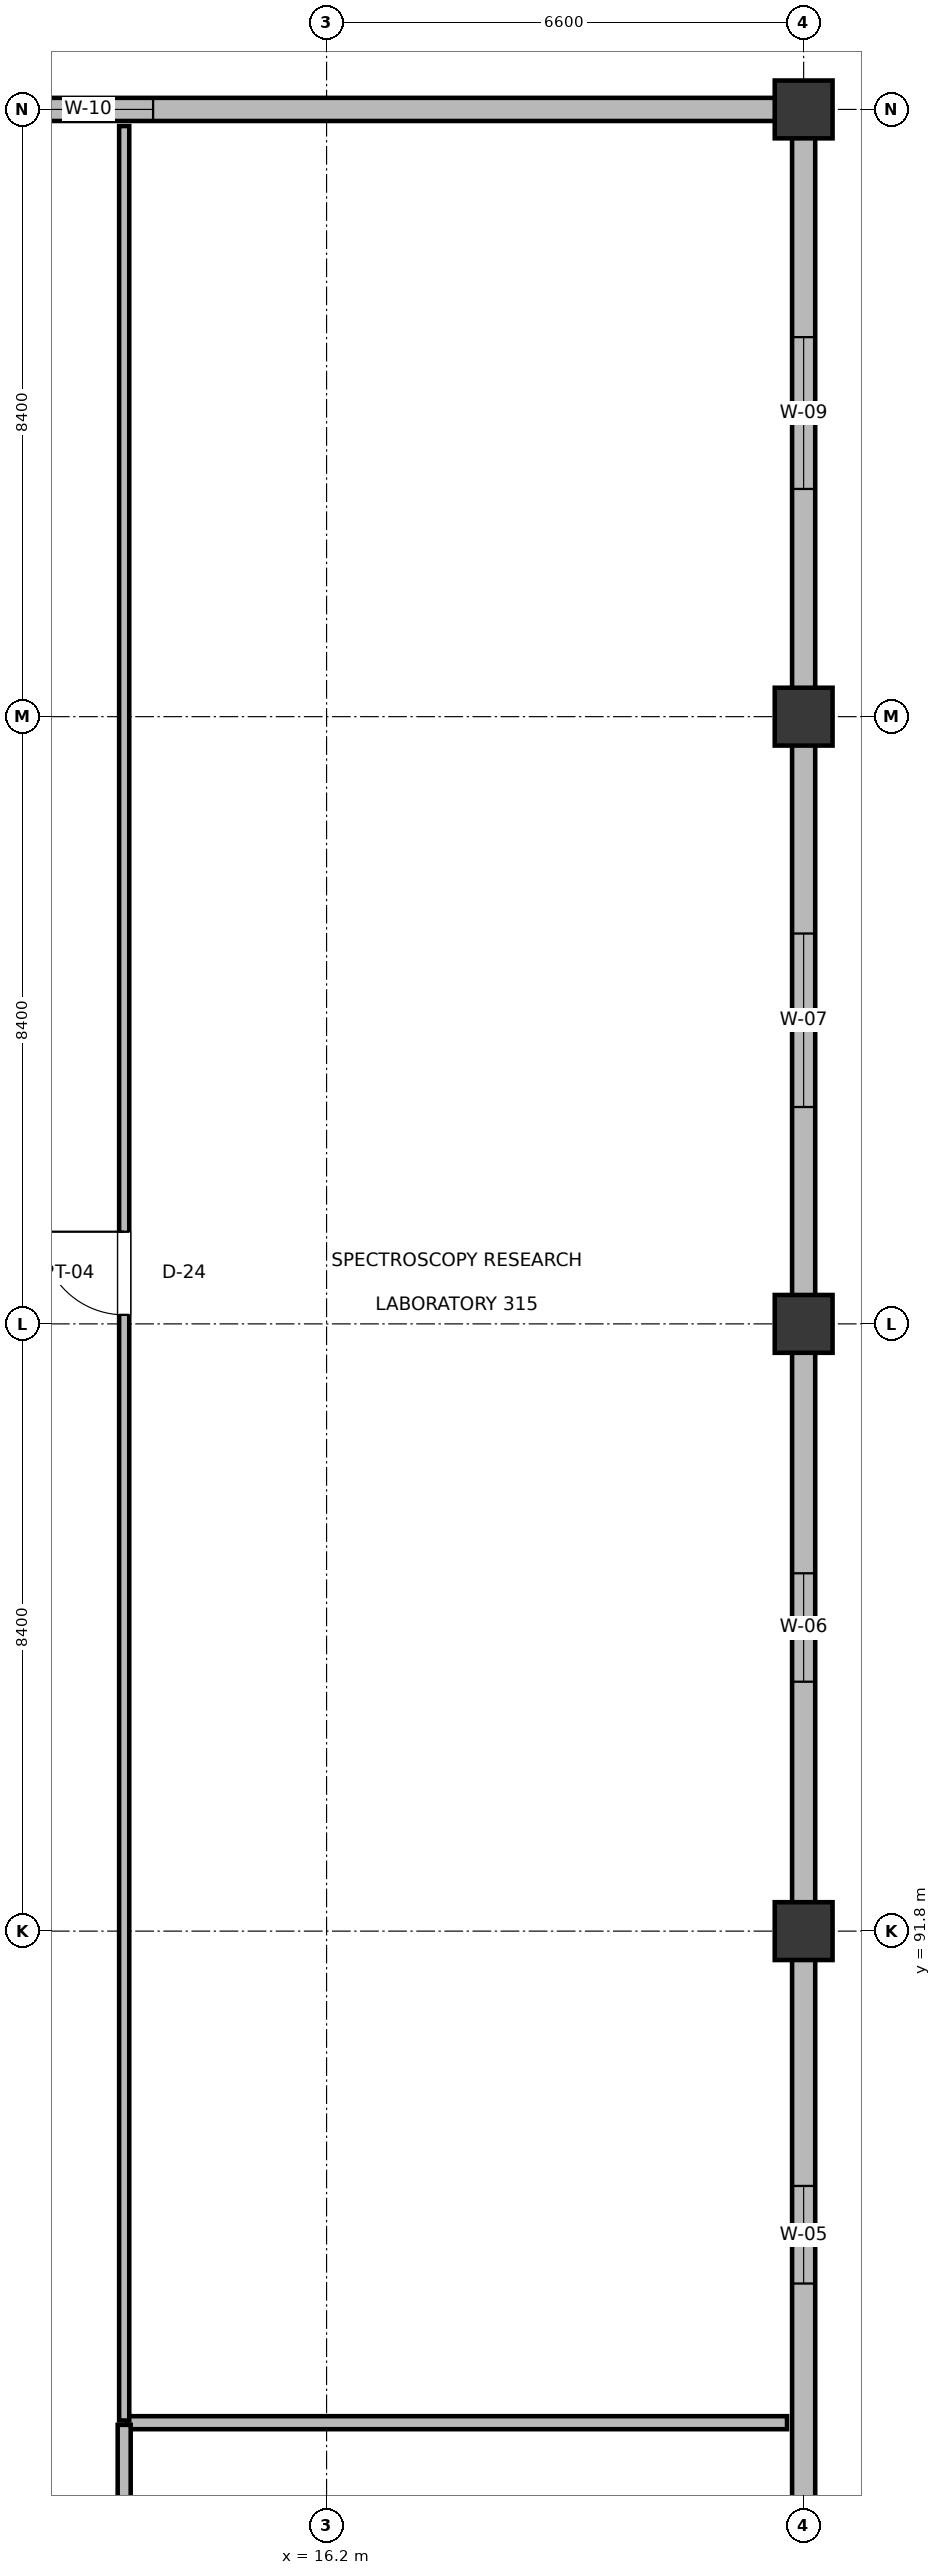
"""IFC4 building model, lengths in metres.
Left out: names, types, materials, properties, quantities, classifications, styles, units other than length and angle.
Written with IfcOpenShell. Run it as: python <this file> out.ifc"""

import sys

from ifc_helpers import new_model, si_unit, direction, frame, frame_2d, origin, origin_2d, place, context, subcontext, project, spatial, rectangle, extrude, element, fill, save


model = new_model("IFC4")
c1 = context("Model", 3, precision=1e-05, world=origin(), true_north=direction((0.0, 1.0)))
c2 = subcontext(c1, "Body", "Model", "MODEL_VIEW")
j1 = project(units=[si_unit("LENGTHUNIT", "METRE"), si_unit("PLANEANGLEUNIT", "RADIAN")], contexts=[c1])
p1 = place(None, origin())
s1 = spatial("IfcSite", under=j1, at=p1, CompositionType="ELEMENT")
p2 = place(p1, origin())
s2 = spatial("IfcBuilding", under=s1, at=p2, CompositionType="ELEMENT")
p3 = place(p2, frame((0.0, 0.0, 15.0)))
s3 = spatial("IfcBuildingStorey", under=s2, at=p3, CompositionType="ELEMENT", Elevation=15.0)
for number, where, z_axis, x_axis in (
    (1, (22.8, 91.8, 0.0), (0.0, 0.0, 1.0), (1.0, 0.0, 0.0)),
    (2, (22.8, 100.2, 0.0), (0.0, 0.0, 1.0), (1.0, 0.0, 0.0)),
    (3, (22.8, 108.6, 0.0), (0.0, 0.0, 1.0), (1.0, 0.0, 0.0)),
    (4, (22.8, 117.0, 0.0), (0.0, 0.0, 1.0), (1.0, 0.0, 0.0)),
):
    element("IfcColumn", number, at=place(p3, frame(where, z_axis=z_axis, x_axis=x_axis)), inside=s3, PredefinedType="COLUMN", context=c2, shape_type="SweptSolid", body=[
        extrude(rectangle(XDim=0.8, YDim=0.8, at=origin_2d()), origin(), (0.0, 0.0, 1.0), 4.5),
    ])
p4 = place(p3, frame((22.8, 83.785, 0.0), z_axis=(0.0, 0.0, 1.0), x_axis=(0.0, 1.0, 0.0)))
e5 = element("IfcWall", 5, at=p4, inside=s3, PredefinedType="SOLIDWALL", context=c2, shape_type="SweptSolid", body=[
    extrude(rectangle(XDim=7.63, YDim=0.32, at=frame_2d((3.815, 0.0))), origin(), (0.0, 0.0, 1.0), 3.525),
])
p5 = place(p4, frame((3.14, 0.0, 0.9)))
e6 = element("IfcOpeningElement", 6, at=p5, cuts=e5, PredefinedType="OPENING", context=c2, shape_type="SweptSolid", body=[
    extrude(rectangle(XDim=1.35, YDim=1.85, at=frame_2d((0.675, 0.925))), frame((0.0, 0.17, 0.0), z_axis=(0.0, -1.0, 0.0), x_axis=(1.0, 0.0, 0.0)), (0.0, 0.0, 1.0), 0.34),
])
p6 = place(p3, frame((22.8, 92.185, 0.0), z_axis=(0.0, 0.0, 1.0), x_axis=(0.0, 1.0, 0.0)))
e7 = element("IfcWall", 7, at=p6, inside=s3, PredefinedType="SOLIDWALL", context=c2, shape_type="SweptSolid", body=[
    extrude(rectangle(XDim=7.63, YDim=0.32, at=frame_2d((3.815, 0.0))), origin(), (0.0, 0.0, 1.0), 3.595),
])
p7 = place(p6, frame((3.065, 0.0, 0.9)))
e8 = element("IfcOpeningElement", 8, at=p7, cuts=e7, PredefinedType="OPENING", context=c2, shape_type="SweptSolid", body=[
    extrude(rectangle(XDim=1.5, YDim=1.9, at=frame_2d((0.75, 0.95))), frame((0.0, 0.17, 0.0), z_axis=(0.0, -1.0, 0.0), x_axis=(1.0, 0.0, 0.0)), (0.0, 0.0, 1.0), 0.34),
])
p8 = place(p3, frame((22.8, 100.585, 0.0), z_axis=(0.0, 0.0, 1.0), x_axis=(0.0, 1.0, 0.0)))
e9 = element("IfcWall", 9, at=p8, inside=s3, PredefinedType="SOLIDWALL", context=c2, shape_type="SweptSolid", body=[
    extrude(rectangle(XDim=7.63, YDim=0.32, at=frame_2d((3.815, 0.0))), origin(), (0.0, 0.0, 1.0), 3.595),
])
p9 = place(p8, frame((2.615, 0.0, 0.9)))
e10 = element("IfcOpeningElement", 10, at=p9, cuts=e9, PredefinedType="OPENING", context=c2, shape_type="SweptSolid", body=[
    extrude(rectangle(XDim=2.4, YDim=1.95, at=frame_2d((1.2, 0.975))), frame((0.0, 0.17, 0.0), z_axis=(0.0, -1.0, 0.0), x_axis=(1.0, 0.0, 0.0)), (0.0, 0.0, 1.0), 0.34),
])
p10 = place(p3, frame((22.8, 108.985, 0.0), z_axis=(0.0, 0.0, 1.0), x_axis=(0.0, 1.0, 0.0)))
e11 = element("IfcWall", 11, at=p10, inside=s3, PredefinedType="SOLIDWALL", context=c2, shape_type="SweptSolid", body=[
    extrude(rectangle(XDim=7.63, YDim=0.32, at=frame_2d((3.815, 0.0))), origin(), (0.0, 0.0, 1.0), 3.595),
])
p11 = place(p10, frame((2.765, 0.0, 0.9)))
e12 = element("IfcOpeningElement", 12, at=p11, cuts=e11, PredefinedType="OPENING", context=c2, shape_type="SweptSolid", body=[
    extrude(rectangle(XDim=2.1, YDim=1.9, at=frame_2d((1.05, 0.95))), frame((0.0, 0.17, 0.0), z_axis=(0.0, -1.0, 0.0), x_axis=(1.0, 0.0, 0.0)), (0.0, 0.0, 1.0), 0.34),
])
p12 = place(p3, frame((3.385, 117.0, 0.0), z_axis=(0.0, 0.0, 1.0), x_axis=(1.0, 0.0, 0.0)))
e13 = element("IfcWall", 13, at=p12, inside=s3, PredefinedType="SOLIDWALL", context=c2, shape_type="SweptSolid", body=[
    extrude(rectangle(XDim=19.03, YDim=0.32, at=frame_2d((9.515, 0.0))), origin(), (0.0, 0.0, 1.0), 3.545),
])
p13 = place(p12, frame((8.615, 0.0, 0.95)))
e14 = element("IfcOpeningElement", 14, at=p13, cuts=e13, PredefinedType="OPENING", context=c2, shape_type="SweptSolid", body=[
    extrude(rectangle(XDim=1.8, YDim=1.75, at=frame_2d((0.9, 0.875))), frame((0.0, 0.17, 0.0), z_axis=(0.0, -1.0, 0.0), x_axis=(1.0, 0.0, 0.0)), (0.0, 0.0, 1.0), 0.34),
])
p14 = place(p3, frame((13.43, 85.0, 0.0), z_axis=(0.0, 0.0, 1.0), x_axis=(1.0, 0.0, 0.0)))
e15 = element("IfcWall", 15, at=p14, inside=s3, PredefinedType="PARTITIONING", context=c2, shape_type="SweptSolid", body=[
    extrude(rectangle(XDim=9.14, YDim=0.18, at=frame_2d((4.57, 0.0))), origin(), (0.0, 0.0, 1.0), 3.525),
])
p15 = place(p3, frame((13.4, 73.853, 0.0), z_axis=(0.0, 0.0, 1.0), x_axis=(0.0, 1.0, 0.0)))
e16 = element("IfcWall", 16, at=p15, inside=s3, PredefinedType="PARTITIONING", context=c2, shape_type="SweptSolid", body=[
    extrude(rectangle(XDim=11.117, YDim=0.18, at=frame_2d((5.558, 0.0))), origin(), (0.0, 0.0, 1.0), 3.335),
])
p16 = place(p15, frame((5.033, 0.0, 0.0)))
e17 = element("IfcOpeningElement", 17, at=p16, cuts=e16, PredefinedType="OPENING", context=c2, shape_type="SweptSolid", body=[
    extrude(rectangle(XDim=1.05, YDim=2.2, at=frame_2d((0.525, 1.1))), frame((0.0, 0.1, 0.0), z_axis=(0.0, -1.0, 0.0), x_axis=(1.0, 0.0, 0.0)), (0.0, 0.0, 1.0), 0.2),
])
p17 = place(p3, frame((13.4, 85.03, 0.0), z_axis=(0.0, 0.0, 1.0), x_axis=(0.0, 1.0, 0.0)))
e18 = element("IfcWall", 18, at=p17, inside=s3, PredefinedType="PARTITIONING", context=c2, shape_type="SweptSolid", body=[
    extrude(rectangle(XDim=31.74, YDim=0.14, at=frame_2d((15.87, 0.0))), origin(), (0.0, 0.0, 1.0), 3.355),
])
p18 = place(p17, frame((15.295, 0.0, 0.0)))
e19 = element("IfcOpeningElement", 19, at=p18, cuts=e18, PredefinedType="OPENING", context=c2, shape_type="SweptSolid", body=[
    extrude(rectangle(XDim=1.15, YDim=2.15, at=frame_2d((0.575, 1.075))), frame((0.0, 0.08, 0.0), z_axis=(0.0, -1.0, 0.0), x_axis=(1.0, 0.0, 0.0)), (0.0, 0.0, 1.0), 0.16),
])
p19 = place(p5, frame((1.35, 0.0, 0.0), z_axis=(0.0, 0.0, 1.0), x_axis=(-1.0, 0.0, 0.0)))
e20 = element("IfcWindow", 20, at=p19, inside=s3, PartitioningType="DOUBLE_PANEL_VERTICAL", PredefinedType="WINDOW", context=c2, shape_type="SweptSolid", body=[
    extrude(rectangle(XDim=1.35, YDim=1.85, at=frame_2d((0.675, 0.925))), frame((0.0, 0.03, 0.0), z_axis=(0.0, -1.0, 0.0), x_axis=(1.0, 0.0, 0.0)), (0.0, 0.0, 1.0), 0.06),
])
fill(e6, e20)
p20 = place(p7, frame((1.5, 0.0, 0.0), z_axis=(0.0, 0.0, 1.0), x_axis=(-1.0, 0.0, 0.0)))
e21 = element("IfcWindow", 21, at=p20, inside=s3, PartitioningType="DOUBLE_PANEL_VERTICAL", PredefinedType="WINDOW", context=c2, shape_type="SweptSolid", body=[
    extrude(rectangle(XDim=1.5, YDim=1.9, at=frame_2d((0.75, 0.95))), frame((0.0, 0.03, 0.0), z_axis=(0.0, -1.0, 0.0), x_axis=(1.0, 0.0, 0.0)), (0.0, 0.0, 1.0), 0.06),
])
fill(e8, e21)
p21 = place(p9, frame((2.4, 0.0, 0.0), z_axis=(0.0, 0.0, 1.0), x_axis=(-1.0, 0.0, 0.0)))
e22 = element("IfcWindow", 22, at=p21, inside=s3, PartitioningType="DOUBLE_PANEL_VERTICAL", PredefinedType="WINDOW", context=c2, shape_type="SweptSolid", body=[
    extrude(rectangle(XDim=2.4, YDim=1.95, at=frame_2d((1.2, 0.975))), frame((0.0, 0.03, 0.0), z_axis=(0.0, -1.0, 0.0), x_axis=(1.0, 0.0, 0.0)), (0.0, 0.0, 1.0), 0.06),
])
fill(e10, e22)
p22 = place(p11, frame((2.1, 0.0, 0.0), z_axis=(0.0, 0.0, 1.0), x_axis=(-1.0, 0.0, 0.0)))
e23 = element("IfcWindow", 23, at=p22, inside=s3, PartitioningType="DOUBLE_PANEL_VERTICAL", PredefinedType="WINDOW", context=c2, shape_type="SweptSolid", body=[
    extrude(rectangle(XDim=2.1, YDim=1.9, at=frame_2d((1.05, 0.95))), frame((0.0, 0.03, 0.0), z_axis=(0.0, -1.0, 0.0), x_axis=(1.0, 0.0, 0.0)), (0.0, 0.0, 1.0), 0.06),
])
fill(e12, e23)
p23 = place(p13, origin())
e24 = element("IfcWindow", 24, at=p23, inside=s3, PartitioningType="DOUBLE_PANEL_HORIZONTAL", PredefinedType="WINDOW", context=c2, shape_type="SweptSolid", body=[
    extrude(rectangle(XDim=1.8, YDim=1.75, at=frame_2d((0.9, 0.875))), frame((0.0, 0.03, 0.0), z_axis=(0.0, -1.0, 0.0), x_axis=(1.0, 0.0, 0.0)), (0.0, 0.0, 1.0), 0.06),
])
fill(e14, e24)
p24 = place(p18, origin())
e25 = element("IfcDoor", 25, at=p24, inside=s3, OperationType="SINGLE_SWING_RIGHT", PredefinedType="DOOR", context=c2, shape_type="SweptSolid", body=[
    extrude(rectangle(XDim=1.15, YDim=2.15, at=frame_2d((0.575, 1.075))), frame((0.0, 0.025, 0.0), z_axis=(0.0, -1.0, 0.0), x_axis=(1.0, 0.0, 0.0)), (0.0, 0.0, 1.0), 0.05),
])
fill(e19, e25)
save(model, sys.argv[1])
